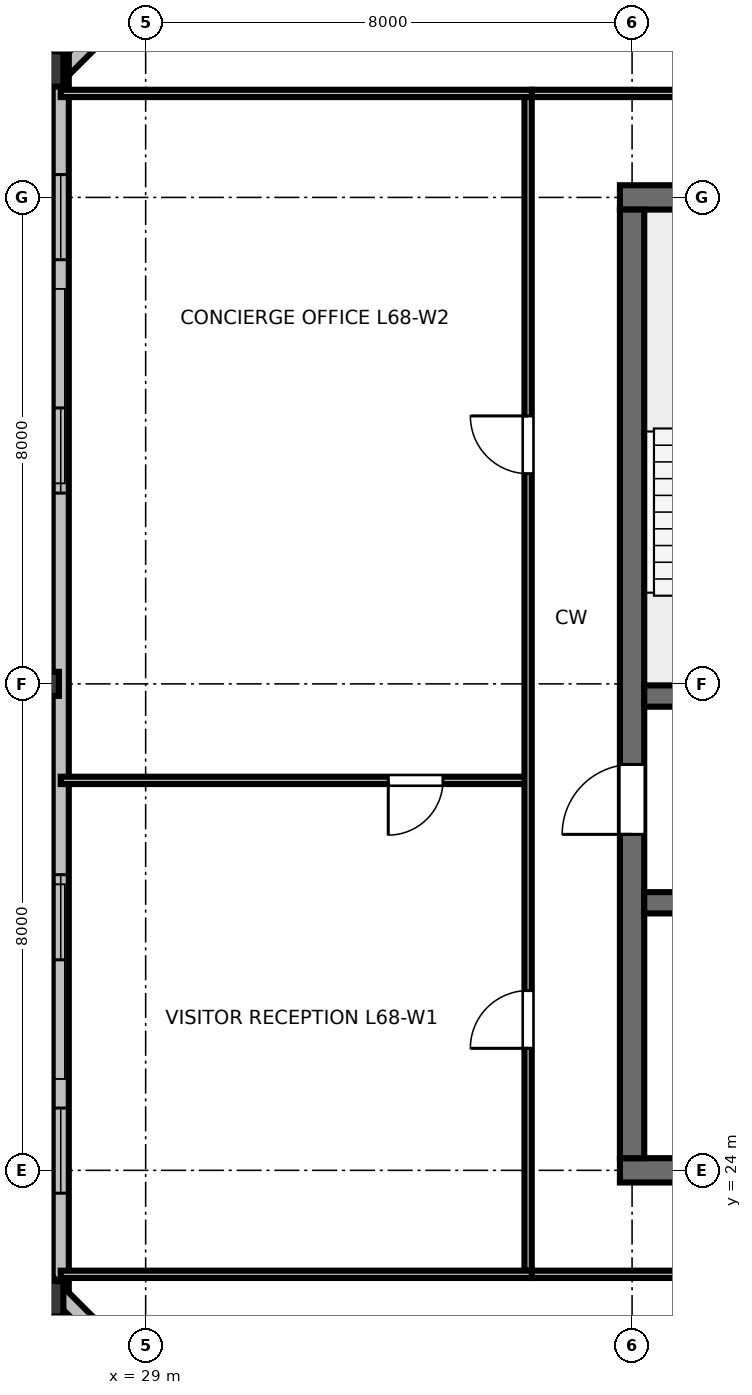
"""IFC4 building model, lengths in metres.
Left out: names, types, materials, properties, quantities, classifications, styles, units other than length and angle.
Written with IfcOpenShell. Run it as: python <this file> out.ifc"""

import sys

from ifc_helpers import new_model, si_unit, direction, frame, frame_2d, origin, origin_2d, place, context, subcontext, project, spatial, rectangle, hollow_rectangle, i_section, extrude, element, fill, save


model = new_model("IFC4")
c1 = context("Model", 3, precision=1e-05, world=origin(), true_north=direction((0.0, 1.0)))
c2 = subcontext(c1, "Body", "Model", "MODEL_VIEW")
j1 = project(units=[si_unit("LENGTHUNIT", "METRE"), si_unit("PLANEANGLEUNIT", "RADIAN")], contexts=[c1])
p1 = place(None, origin())
s1 = spatial("IfcSite", under=j1, at=p1, CompositionType="ELEMENT")
p2 = place(p1, origin())
s2 = spatial("IfcBuilding", under=s1, at=p2, CompositionType="ELEMENT")
p3 = place(p2, frame((0.0, 0.0, 257.4)))
s3 = spatial("IfcBuildingStorey", under=s2, at=p3, CompositionType="ELEMENT", Elevation=257.4)
p4 = place(p3, frame((36.8, 24.0, 0.0), z_axis=(0.0, 0.0, 1.0), x_axis=(1.0, 0.0, 0.0)))
e1 = element("IfcWall", 1, at=p4, inside=s3, PredefinedType="SHEAR", context=c2, shape_type="SweptSolid", body=[
    extrude(rectangle(XDim=18.4, YDim=0.4, at=frame_2d((9.2, 0.0))), origin(), (0.0, 0.0, 1.0), 3.36),
])
p5 = place(p4, frame((13.4, 0.0, 0.0)))
e2 = element("IfcOpeningElement", 2, at=p5, cuts=e1, PredefinedType="OPENING", context=c2, shape_type="SweptSolid", body=[
    extrude(rectangle(XDim=1.6, YDim=2.15, at=frame_2d((0.8, 1.075))), frame((0.0, 0.21, 0.0), z_axis=(0.0, -1.0, 0.0), x_axis=(1.0, 0.0, 0.0)), (0.0, 0.0, 1.0), 0.42),
])
p6 = place(p3, frame((36.8, 40.0, 0.0), z_axis=(0.0, 0.0, 1.0), x_axis=(1.0, 0.0, 0.0)))
e3 = element("IfcWall", 3, at=p6, inside=s3, PredefinedType="SHEAR", context=c2, shape_type="SweptSolid", body=[
    extrude(rectangle(XDim=18.4, YDim=0.4, at=frame_2d((9.2, 0.0))), origin(), (0.0, 0.0, 1.0), 3.36),
])
p7 = place(p6, frame((8.7, 0.0, 0.0)))
e4 = element("IfcOpeningElement", 4, at=p7, cuts=e3, PredefinedType="OPENING", context=c2, shape_type="SweptSolid", body=[
    extrude(rectangle(XDim=1.0, YDim=2.15, at=frame_2d((0.5, 1.075))), frame((0.0, 0.21, 0.0), z_axis=(0.0, -1.0, 0.0), x_axis=(1.0, 0.0, 0.0)), (0.0, 0.0, 1.0), 0.42),
])
p8 = place(p3, frame((37.0, 24.2, 0.0), z_axis=(0.0, 0.0, 1.0), x_axis=(0.0, 1.0, 0.0)))
e5 = element("IfcWall", 5, at=p8, inside=s3, PredefinedType="SHEAR", context=c2, shape_type="SweptSolid", body=[
    extrude(rectangle(XDim=15.6, YDim=0.4, at=frame_2d((7.8, 0.0))), origin(), (0.0, 0.0, 1.0), 3.36),
])
p9 = place(p8, frame((5.325, 0.0, 0.0)))
e6 = element("IfcOpeningElement", 6, at=p9, cuts=e5, PredefinedType="OPENING", context=c2, shape_type="SweptSolid", body=[
    extrude(rectangle(XDim=1.15, YDim=2.15, at=frame_2d((0.575, 1.075))), frame((0.0, 0.21, 0.0), z_axis=(0.0, -1.0, 0.0), x_axis=(1.0, 0.0, 0.0)), (0.0, 0.0, 1.0), 0.42),
])
p10 = place(p3, frame((37.2, 31.8, 0.0), z_axis=(0.0, 0.0, 1.0), x_axis=(1.0, 0.0, 0.0)))
e7 = element("IfcWall", 7, at=p10, inside=s3, PredefinedType="SHEAR", context=c2, shape_type="SweptSolid", body=[
    extrude(rectangle(XDim=17.6, YDim=0.35, at=frame_2d((8.8, 0.0))), origin(), (0.0, 0.0, 1.0), 3.36),
])
p11 = place(p10, frame((0.85, 0.0, 0.0)))
e8 = element("IfcOpeningElement", 8, at=p11, cuts=e7, PredefinedType="OPENING", context=c2, shape_type="SweptSolid", body=[
    extrude(rectangle(XDim=1.1, YDim=2.15, at=frame_2d((0.55, 1.075))), frame((0.0, 0.185, 0.0), z_axis=(0.0, -1.0, 0.0), x_axis=(1.0, 0.0, 0.0)), (0.0, 0.0, 1.0), 0.37),
])
p12 = place(p10, frame((14.75, 0.0, 0.0)))
e9 = element("IfcOpeningElement", 9, at=p12, cuts=e7, PredefinedType="OPENING", context=c2, shape_type="SweptSolid", body=[
    extrude(rectangle(XDim=1.1, YDim=2.15, at=frame_2d((0.55, 1.075))), frame((0.0, 0.185, 0.0), z_axis=(0.0, -1.0, 0.0), x_axis=(1.0, 0.0, 0.0)), (0.0, 0.0, 1.0), 0.37),
])
p13 = place(p3, frame((37.2, 28.4, 0.0), z_axis=(0.0, 0.0, 1.0), x_axis=(1.0, 0.0, 0.0)))
e10 = element("IfcWall", 10, at=p13, inside=s3, PredefinedType="SHEAR", context=c2, shape_type="SweptSolid", body=[
    extrude(rectangle(XDim=17.6, YDim=0.35, at=frame_2d((8.8, 0.0))), origin(), (0.0, 0.0, 1.0), 3.36),
])
p14 = place(p3, frame((27.297, 42.112, 0.0), z_axis=(0.177662325412, -0.155507284832, 0.971727113182), x_axis=(-0.731191579458, 0.640009731663, 0.23610679259)))
e11 = element("IfcColumn", 11, at=p14, inside=s3, PredefinedType="COLUMN", context=c2, shape_type="SweptSolid", body=[
    extrude(hollow_rectangle(XDim=0.58, YDim=0.7, WallThickness=0.032, at=origin_2d()), origin(), (0.0, 0.0, 1.0), 3.471),
])
p15 = place(p3, frame((27.384, 32.0, 0.0), z_axis=(0.179023300051, 0.0, 0.98384483433), x_axis=(-0.98384483433, 0.0, 0.179023300051)))
e12 = element("IfcColumn", 12, at=p15, inside=s3, PredefinedType="COLUMN", context=c2, shape_type="SweptSolid", body=[
    extrude(i_section(OverallWidth=0.395, OverallDepth=0.38, WebThickness=0.019, FlangeThickness=0.03, FilletRadius=0.025, at=origin_2d()), origin(), (0.0, 0.0, 1.0), 3.428),
])
p16 = place(p3, frame((27.297, 21.888, 0.0), z_axis=(0.177662325412, 0.155507284832, 0.971727113182), x_axis=(-0.731191579458, -0.640009731663, 0.23610679259)))
e13 = element("IfcColumn", 13, at=p16, inside=s3, PredefinedType="COLUMN", context=c2, shape_type="SweptSolid", body=[
    extrude(hollow_rectangle(XDim=0.58, YDim=0.7, WallThickness=0.032, at=origin_2d()), origin(), (0.0, 0.0, 1.0), 3.471),
])
p17 = place(p3, frame((34.807, 49.269, 0.0), z_axis=(0.0, 0.0, 1.0), x_axis=(-0.707106781187, -0.707106781187, 0.0)))
e14 = element("IfcWall", 14, at=p17, inside=s3, PredefinedType="STANDARD", context=c2, shape_type="SweptSolid", body=[
    extrude(rectangle(XDim=10.816, YDim=0.265, at=frame_2d((5.408, 0.0))), origin(), (0.0, 0.0, 1.0), 3.375),
])
p18 = place(p3, frame((27.604, 42.695, 0.0), z_axis=(0.0, 0.0, 1.0), x_axis=(0.0, -1.0, 0.0)))
e15 = element("IfcWall", 15, at=p18, inside=s3, PredefinedType="STANDARD", context=c2, shape_type="SweptSolid", body=[
    extrude(rectangle(XDim=21.389, YDim=0.265, at=frame_2d((10.695, 0.0))), origin(), (0.0, 0.0, 1.0), 2.832),
])
p19 = place(p18, frame((2.319, 0.0, 0.85)))
e16 = element("IfcOpeningElement", 16, at=p19, cuts=e15, PredefinedType="OPENING", context=c2, shape_type="SweptSolid", body=[
    extrude(rectangle(XDim=1.4, YDim=1.2, at=frame_2d((0.7, 0.6))), frame((0.0, 0.142, 0.0), z_axis=(0.0, -1.0, 0.0), x_axis=(1.0, 0.0, 0.0)), (0.0, 0.0, 1.0), 0.285),
])
p20 = place(p18, frame((6.157, 0.0, 0.85)))
e17 = element("IfcOpeningElement", 17, at=p20, cuts=e15, PredefinedType="OPENING", context=c2, shape_type="SweptSolid", body=[
    extrude(rectangle(XDim=1.4, YDim=1.2, at=frame_2d((0.7, 0.6))), frame((0.0, 0.142, 0.0), z_axis=(0.0, -1.0, 0.0), x_axis=(1.0, 0.0, 0.0)), (0.0, 0.0, 1.0), 0.285),
])
p21 = place(p18, frame((13.832, 0.0, 0.85)))
e18 = element("IfcOpeningElement", 18, at=p21, cuts=e15, PredefinedType="OPENING", context=c2, shape_type="SweptSolid", body=[
    extrude(rectangle(XDim=1.4, YDim=1.2, at=frame_2d((0.7, 0.6))), frame((0.0, 0.142, 0.0), z_axis=(0.0, -1.0, 0.0), x_axis=(1.0, 0.0, 0.0)), (0.0, 0.0, 1.0), 0.285),
])
p22 = place(p18, frame((17.67, 0.0, 0.85)))
e19 = element("IfcOpeningElement", 19, at=p22, cuts=e15, PredefinedType="OPENING", context=c2, shape_type="SweptSolid", body=[
    extrude(rectangle(XDim=1.4, YDim=1.2, at=frame_2d((0.7, 0.6))), frame((0.0, 0.142, 0.0), z_axis=(0.0, -1.0, 0.0), x_axis=(1.0, 0.0, 0.0)), (0.0, 0.0, 1.0), 0.285),
])
p23 = place(p3, frame((27.159, 22.38, 0.0), z_axis=(0.0, 0.0, 1.0), x_axis=(0.707106781187, -0.707106781187, 0.0)))
e20 = element("IfcWall", 20, at=p23, inside=s3, PredefinedType="STANDARD", context=c2, shape_type="SweptSolid", body=[
    extrude(rectangle(XDim=10.816, YDim=0.265, at=frame_2d((5.408, 0.0))), origin(), (0.0, 0.0, 1.0), 3.375),
])
p24 = place(p3, frame((35.35, 22.29, 0.0), z_axis=(0.0, 0.0, 1.0), x_axis=(1.0, 0.0, 0.0)))
e21 = element("IfcWall", 21, at=p24, inside=s3, PredefinedType="PARTITIONING", context=c2, shape_type="SweptSolid", body=[
    extrude(rectangle(XDim=21.3, YDim=0.12, at=frame_2d((10.65, 0.0))), origin(), (0.0, 0.0, 1.0), 2.655),
])
p25 = place(p24, frame((3.767, 0.0, 0.0)))
e22 = element("IfcOpeningElement", 22, at=p25, cuts=e21, PredefinedType="OPENING", context=c2, shape_type="SweptSolid", body=[
    extrude(rectangle(XDim=0.95, YDim=2.15, at=frame_2d((0.475, 1.075))), frame((0.0, 0.07, 0.0), z_axis=(0.0, -1.0, 0.0), x_axis=(1.0, 0.0, 0.0)), (0.0, 0.0, 1.0), 0.14),
])
p26 = place(p24, frame((15.925, 0.0, 0.0)))
e23 = element("IfcOpeningElement", 23, at=p26, cuts=e21, PredefinedType="OPENING", context=c2, shape_type="SweptSolid", body=[
    extrude(rectangle(XDim=0.95, YDim=2.15, at=frame_2d((0.475, 1.075))), frame((0.0, 0.07, 0.0), z_axis=(0.0, -1.0, 0.0), x_axis=(1.0, 0.0, 0.0)), (0.0, 0.0, 1.0), 0.14),
])
p27 = place(p3, frame((35.35, 41.71, 0.0), z_axis=(0.0, 0.0, 1.0), x_axis=(1.0, 0.0, 0.0)))
e24 = element("IfcWall", 24, at=p27, inside=s3, PredefinedType="PARTITIONING", context=c2, shape_type="SweptSolid", body=[
    extrude(rectangle(XDim=21.3, YDim=0.12, at=frame_2d((10.65, 0.0))), origin(), (0.0, 0.0, 1.0), 2.655),
])
p28 = place(p27, frame((3.472, 0.0, 0.0)))
e25 = element("IfcOpeningElement", 25, at=p28, cuts=e24, PredefinedType="OPENING", context=c2, shape_type="SweptSolid", body=[
    extrude(rectangle(XDim=0.95, YDim=2.15, at=frame_2d((0.475, 1.075))), frame((0.0, 0.07, 0.0), z_axis=(0.0, -1.0, 0.0), x_axis=(1.0, 0.0, 0.0)), (0.0, 0.0, 1.0), 0.14),
])
p29 = place(p27, frame((12.975, 0.0, 0.0)))
e26 = element("IfcOpeningElement", 26, at=p29, cuts=e24, PredefinedType="OPENING", context=c2, shape_type="SweptSolid", body=[
    extrude(rectangle(XDim=0.95, YDim=2.15, at=frame_2d((0.475, 1.075))), frame((0.0, 0.07, 0.0), z_axis=(0.0, -1.0, 0.0), x_axis=(1.0, 0.0, 0.0)), (0.0, 0.0, 1.0), 0.14),
])
p30 = place(p27, frame((17.735, 0.0, 0.0)))
e27 = element("IfcOpeningElement", 27, at=p30, cuts=e24, PredefinedType="OPENING", context=c2, shape_type="SweptSolid", body=[
    extrude(rectangle(XDim=0.95, YDim=2.15, at=frame_2d((0.475, 1.075))), frame((0.0, 0.07, 0.0), z_axis=(0.0, -1.0, 0.0), x_axis=(1.0, 0.0, 0.0)), (0.0, 0.0, 1.0), 0.14),
])
p31 = place(p3, frame((35.29, 30.413, 0.0), z_axis=(0.0, 0.0, 1.0), x_axis=(-1.0, 0.0, 0.0)))
e28 = element("IfcWall", 28, at=p31, inside=s3, PredefinedType="PARTITIONING", context=c2, shape_type="SweptSolid", body=[
    extrude(rectangle(XDim=7.687, YDim=0.12, at=frame_2d((3.843, 0.0))), origin(), (0.0, 0.0, 1.0), 2.655),
])
p32 = place(p31, frame((1.4, 0.0, 0.0)))
e29 = element("IfcOpeningElement", 29, at=p32, cuts=e28, PredefinedType="OPENING", context=c2, shape_type="SweptSolid", body=[
    extrude(rectangle(XDim=0.9, YDim=2.15, at=frame_2d((0.45, 1.075))), frame((0.0, 0.07, 0.0), z_axis=(0.0, -1.0, 0.0), x_axis=(1.0, 0.0, 0.0)), (0.0, 0.0, 1.0), 0.14),
])
p33 = place(p3, frame((35.29, 22.35, 0.0), z_axis=(0.0, 0.0, 1.0), x_axis=(0.0, 1.0, 0.0)))
e30 = element("IfcWall", 30, at=p33, inside=s3, PredefinedType="PARTITIONING", context=c2, shape_type="SweptSolid", body=[
    extrude(rectangle(XDim=19.3, YDim=0.12, at=frame_2d((9.65, 0.0))), origin(), (0.0, 0.0, 1.0), 2.655),
])
p34 = place(p33, frame((3.656, 0.0, 0.0)))
e31 = element("IfcOpeningElement", 31, at=p34, cuts=e30, PredefinedType="OPENING", context=c2, shape_type="SweptSolid", body=[
    extrude(rectangle(XDim=0.95, YDim=2.15, at=frame_2d((0.475, 1.075))), frame((0.0, 0.07, 0.0), z_axis=(0.0, -1.0, 0.0), x_axis=(1.0, 0.0, 0.0)), (0.0, 0.0, 1.0), 0.14),
])
p35 = place(p33, frame((13.106, 0.0, 0.0)))
e32 = element("IfcOpeningElement", 32, at=p35, cuts=e30, PredefinedType="OPENING", context=c2, shape_type="SweptSolid", body=[
    extrude(rectangle(XDim=0.95, YDim=2.15, at=frame_2d((0.475, 1.075))), frame((0.0, 0.07, 0.0), z_axis=(0.0, -1.0, 0.0), x_axis=(1.0, 0.0, 0.0)), (0.0, 0.0, 1.0), 0.14),
])
for number, where, z_axis, x_axis in (
    (33, (35.35, 22.29, 0.0), (0.0, 0.0, 1.0), (-1.0, 0.0, 0.0)),
    (34, (35.35, 41.71, 0.0), (0.0, 0.0, 1.0), (-1.0, 0.0, 0.0)),
):
    element("IfcWall", number, at=place(p3, frame(where, z_axis=z_axis, x_axis=x_axis)), inside=s3, PredefinedType="PARTITIONING", context=c2, shape_type="SweptSolid", body=[
        extrude(rectangle(XDim=7.747, YDim=0.12, at=frame_2d((3.873, 0.0))), origin(), (0.0, 0.0, 1.0), 2.655),
    ])
p36 = place(p19, origin())
e35 = element("IfcWindow", 35, at=p36, inside=s3, PartitioningType="SINGLE_PANEL", PredefinedType="WINDOW", context=c2, shape_type="SweptSolid", body=[
    extrude(rectangle(XDim=1.4, YDim=1.2, at=frame_2d((0.7, 0.6))), frame((0.0, 0.03, 0.0), z_axis=(0.0, -1.0, 0.0), x_axis=(1.0, 0.0, 0.0)), (0.0, 0.0, 1.0), 0.06),
])
fill(e16, e35)
p37 = place(p20, origin())
e36 = element("IfcWindow", 36, at=p37, inside=s3, PartitioningType="SINGLE_PANEL", PredefinedType="WINDOW", context=c2, shape_type="SweptSolid", body=[
    extrude(rectangle(XDim=1.4, YDim=1.2, at=frame_2d((0.7, 0.6))), frame((0.0, 0.03, 0.0), z_axis=(0.0, -1.0, 0.0), x_axis=(1.0, 0.0, 0.0)), (0.0, 0.0, 1.0), 0.06),
])
fill(e17, e36)
p38 = place(p21, origin())
e37 = element("IfcWindow", 37, at=p38, inside=s3, PartitioningType="SINGLE_PANEL", PredefinedType="WINDOW", context=c2, shape_type="SweptSolid", body=[
    extrude(rectangle(XDim=1.4, YDim=1.2, at=frame_2d((0.7, 0.6))), frame((0.0, 0.03, 0.0), z_axis=(0.0, -1.0, 0.0), x_axis=(1.0, 0.0, 0.0)), (0.0, 0.0, 1.0), 0.06),
])
fill(e18, e37)
p39 = place(p22, origin())
e38 = element("IfcWindow", 38, at=p39, inside=s3, PartitioningType="SINGLE_PANEL", PredefinedType="WINDOW", context=c2, shape_type="SweptSolid", body=[
    extrude(rectangle(XDim=1.4, YDim=1.2, at=frame_2d((0.7, 0.6))), frame((0.0, 0.03, 0.0), z_axis=(0.0, -1.0, 0.0), x_axis=(1.0, 0.0, 0.0)), (0.0, 0.0, 1.0), 0.06),
])
fill(e19, e38)
p40 = place(p9, origin())
e39 = element("IfcDoor", 39, at=p40, inside=s3, OperationType="SINGLE_SWING_LEFT", PredefinedType="DOOR", context=c2, shape_type="SweptSolid", body=[
    extrude(rectangle(XDim=1.15, YDim=2.15, at=frame_2d((0.575, 1.075))), frame((0.0, 0.025, 0.0), z_axis=(0.0, -1.0, 0.0), x_axis=(1.0, 0.0, 0.0)), (0.0, 0.0, 1.0), 0.05),
])
fill(e6, e39)
p41 = place(p32, origin())
e40 = element("IfcDoor", 40, at=p41, inside=s3, OperationType="SINGLE_SWING_RIGHT", PredefinedType="DOOR", context=c2, shape_type="SweptSolid", body=[
    extrude(rectangle(XDim=0.9, YDim=2.15, at=frame_2d((0.45, 1.075))), frame((0.0, 0.025, 0.0), z_axis=(0.0, -1.0, 0.0), x_axis=(1.0, 0.0, 0.0)), (0.0, 0.0, 1.0), 0.05),
])
fill(e29, e40)
p42 = place(p34, origin())
e41 = element("IfcDoor", 41, at=p42, inside=s3, OperationType="SINGLE_SWING_LEFT", PredefinedType="DOOR", context=c2, shape_type="SweptSolid", body=[
    extrude(rectangle(XDim=0.95, YDim=2.15, at=frame_2d((0.475, 1.075))), frame((0.0, 0.025, 0.0), z_axis=(0.0, -1.0, 0.0), x_axis=(1.0, 0.0, 0.0)), (0.0, 0.0, 1.0), 0.05),
])
fill(e31, e41)
p43 = place(p35, origin())
e42 = element("IfcDoor", 42, at=p43, inside=s3, OperationType="SINGLE_SWING_RIGHT", PredefinedType="DOOR", context=c2, shape_type="SweptSolid", body=[
    extrude(rectangle(XDim=0.95, YDim=2.15, at=frame_2d((0.475, 1.075))), frame((0.0, 0.025, 0.0), z_axis=(0.0, -1.0, 0.0), x_axis=(1.0, 0.0, 0.0)), (0.0, 0.0, 1.0), 0.05),
])
fill(e32, e42)
save(model, sys.argv[1])
